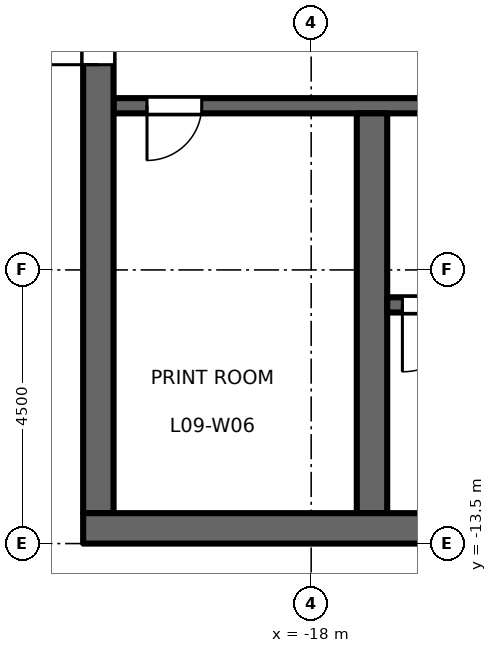
"""IFC4 building model, lengths in metres.
Left out: names, types, materials, properties, quantities, classifications, styles, units other than length and angle.
Written with IfcOpenShell. Run it as: python <this file> out.ifc"""

import sys

from ifc_helpers import new_model, si_unit, direction, frame, frame_2d, origin, place, context, subcontext, project, spatial, rectangle, extrude, element, fill, save


model = new_model("IFC4")
c1 = context("Model", 3, precision=1e-05, world=origin(), true_north=direction((0.0, 1.0)))
c2 = subcontext(c1, "Body", "Model", "MODEL_VIEW")
j1 = project(units=[si_unit("LENGTHUNIT", "METRE"), si_unit("PLANEANGLEUNIT", "RADIAN")], contexts=[c1])
p1 = place(None, origin())
s1 = spatial("IfcSite", under=j1, at=p1, CompositionType="ELEMENT")
p2 = place(p1, origin())
s2 = spatial("IfcBuilding", under=s1, at=p2, CompositionType="ELEMENT")
p3 = place(p2, frame((0.0, 0.0, 44.7)))
s3 = spatial("IfcBuildingStorey", under=s2, at=p3, CompositionType="ELEMENT", Elevation=44.7)
p4 = place(p3, frame((-12.15, -6.3, 0.0), z_axis=(0.0, 0.0, 1.0), x_axis=(-1.0, 0.0, 0.0)))
e1 = element("IfcWall", 1, at=p4, inside=s3, PredefinedType="SHEAR", context=c2, shape_type="SweptSolid", body=[
    extrude(rectangle(XDim=9.1, YDim=0.25, at=frame_2d((4.55, 0.0))), origin(), (0.0, 0.0, 1.0), 4.35),
])
p5 = place(p4, frame((1.8, 0.0, 0.0)))
e2 = element("IfcOpeningElement", 2, at=p5, cuts=e1, PredefinedType="OPENING", context=c2, shape_type="SweptSolid", body=[
    extrude(rectangle(XDim=1.0, YDim=2.1, at=frame_2d((0.5, 1.05))), frame((0.0, 0.135, 0.0), z_axis=(0.0, -1.0, 0.0), x_axis=(1.0, 0.0, 0.0)), (0.0, 0.0, 1.0), 0.27),
])
p6 = place(p4, frame((7.65, 0.0, 0.0)))
e3 = element("IfcOpeningElement", 3, at=p6, cuts=e1, PredefinedType="OPENING", context=c2, shape_type="SweptSolid", body=[
    extrude(rectangle(XDim=0.9, YDim=2.1, at=frame_2d((0.45, 1.05))), frame((0.0, 0.135, 0.0), z_axis=(0.0, -1.0, 0.0), x_axis=(1.0, 0.0, 0.0)), (0.0, 0.0, 1.0), 0.27),
])
p7 = place(p3, frame((-21.5, -13.0, 0.0), z_axis=(0.0, 0.0, 1.0), x_axis=(0.0, 1.0, 0.0)))
e4 = element("IfcWall", 4, at=p7, inside=s3, PredefinedType="SHEAR", context=c2, shape_type="SweptSolid", body=[
    extrude(rectangle(XDim=26.0, YDim=0.5, at=frame_2d((13.0, 0.0))), origin(), (0.0, 0.0, 1.0), 4.35),
])
p8 = place(p7, frame((16.825, 0.0, 0.0)))
e5 = element("IfcOpeningElement", 5, at=p8, cuts=e4, PredefinedType="OPENING", context=c2, shape_type="SweptSolid", body=[
    extrude(rectangle(XDim=1.8, YDim=2.1, at=frame_2d((0.9, 1.05))), frame((0.0, 0.26, 0.0), z_axis=(0.0, -1.0, 0.0), x_axis=(1.0, 0.0, 0.0)), (0.0, 0.0, 1.0), 0.52),
])
p9 = place(p7, frame((7.375, 0.0, 0.0)))
e6 = element("IfcOpeningElement", 6, at=p9, cuts=e4, PredefinedType="OPENING", context=c2, shape_type="SweptSolid", body=[
    extrude(rectangle(XDim=1.8, YDim=2.1, at=frame_2d((0.9, 1.05))), frame((0.0, 0.26, 0.0), z_axis=(0.0, -1.0, 0.0), x_axis=(1.0, 0.0, 0.0)), (0.0, 0.0, 1.0), 0.52),
])
p10 = place(p3, frame((-17.0, -13.0, 0.0), z_axis=(0.0, 0.0, 1.0), x_axis=(0.0, 1.0, 0.0)))
e7 = element("IfcWall", 7, at=p10, inside=s3, PredefinedType="SHEAR", context=c2, shape_type="SweptSolid", body=[
    extrude(rectangle(XDim=6.575, YDim=0.5, at=frame_2d((3.288, 0.0))), origin(), (0.0, 0.0, 1.0), 4.35),
])
p11 = place(p3, frame((-8.75, -9.575, 0.0), z_axis=(0.0, 0.0, 1.0), x_axis=(-1.0, 0.0, 0.0)))
e8 = element("IfcWall", 8, at=p11, inside=s3, PredefinedType="SHEAR", context=c2, shape_type="SweptSolid", body=[
    extrude(rectangle(XDim=8.0, YDim=0.25, at=frame_2d((4.0, 0.0))), origin(), (0.0, 0.0, 1.0), 4.35),
])
p12 = place(p11, frame((6.65, 0.0, 0.0)))
e9 = element("IfcOpeningElement", 9, at=p12, cuts=e8, PredefinedType="OPENING", context=c2, shape_type="SweptSolid", body=[
    extrude(rectangle(XDim=1.1, YDim=2.1, at=frame_2d((0.55, 1.05))), frame((0.0, 0.135, 0.0), z_axis=(0.0, -1.0, 0.0), x_axis=(1.0, 0.0, 0.0)), (0.0, 0.0, 1.0), 0.27),
])
p13 = place(p3, frame((-8.25, -13.25, 0.0), z_axis=(0.0, 0.0, 1.0), x_axis=(-1.0, 0.0, 0.0)))
e10 = element("IfcWall", 10, at=p13, inside=s3, PredefinedType="SHEAR", context=c2, shape_type="SweptSolid", body=[
    extrude(rectangle(XDim=13.5, YDim=0.5, at=frame_2d((6.75, 0.0))), origin(), (0.0, 0.0, 1.0), 4.35),
])
p14 = place(p12, origin())
e11 = element("IfcDoor", 11, at=p14, inside=s3, OperationType="SINGLE_SWING_LEFT", PredefinedType="DOOR", context=c2, shape_type="SweptSolid", body=[
    extrude(rectangle(XDim=1.1, YDim=2.1, at=frame_2d((0.55, 1.05))), frame((0.0, 0.025, 0.0), z_axis=(0.0, -1.0, 0.0), x_axis=(1.0, 0.0, 0.0)), (0.0, 0.0, 1.0), 0.05),
])
fill(e9, e11)
p15 = place(p9, origin())
e12 = element("IfcDoor", 12, at=p15, inside=s3, OperationType="DOUBLE_DOOR_DOUBLE_SWING", PredefinedType="DOOR", context=c2, shape_type="SweptSolid", body=[
    extrude(rectangle(XDim=1.8, YDim=2.1, at=frame_2d((0.9, 1.05))), frame((0.0, 0.025, 0.0), z_axis=(0.0, -1.0, 0.0), x_axis=(1.0, 0.0, 0.0)), (0.0, 0.0, 1.0), 0.05),
])
fill(e6, e12)
p16 = place(p6, origin())
e13 = element("IfcDoor", 13, at=p16, inside=s3, OperationType="SINGLE_SWING_LEFT", PredefinedType="DOOR", context=c2, shape_type="SweptSolid", body=[
    extrude(rectangle(XDim=0.9, YDim=2.1, at=frame_2d((0.45, 1.05))), frame((0.0, 0.025, 0.0), z_axis=(0.0, -1.0, 0.0), x_axis=(1.0, 0.0, 0.0)), (0.0, 0.0, 1.0), 0.05),
])
fill(e3, e13)
save(model, sys.argv[1])
